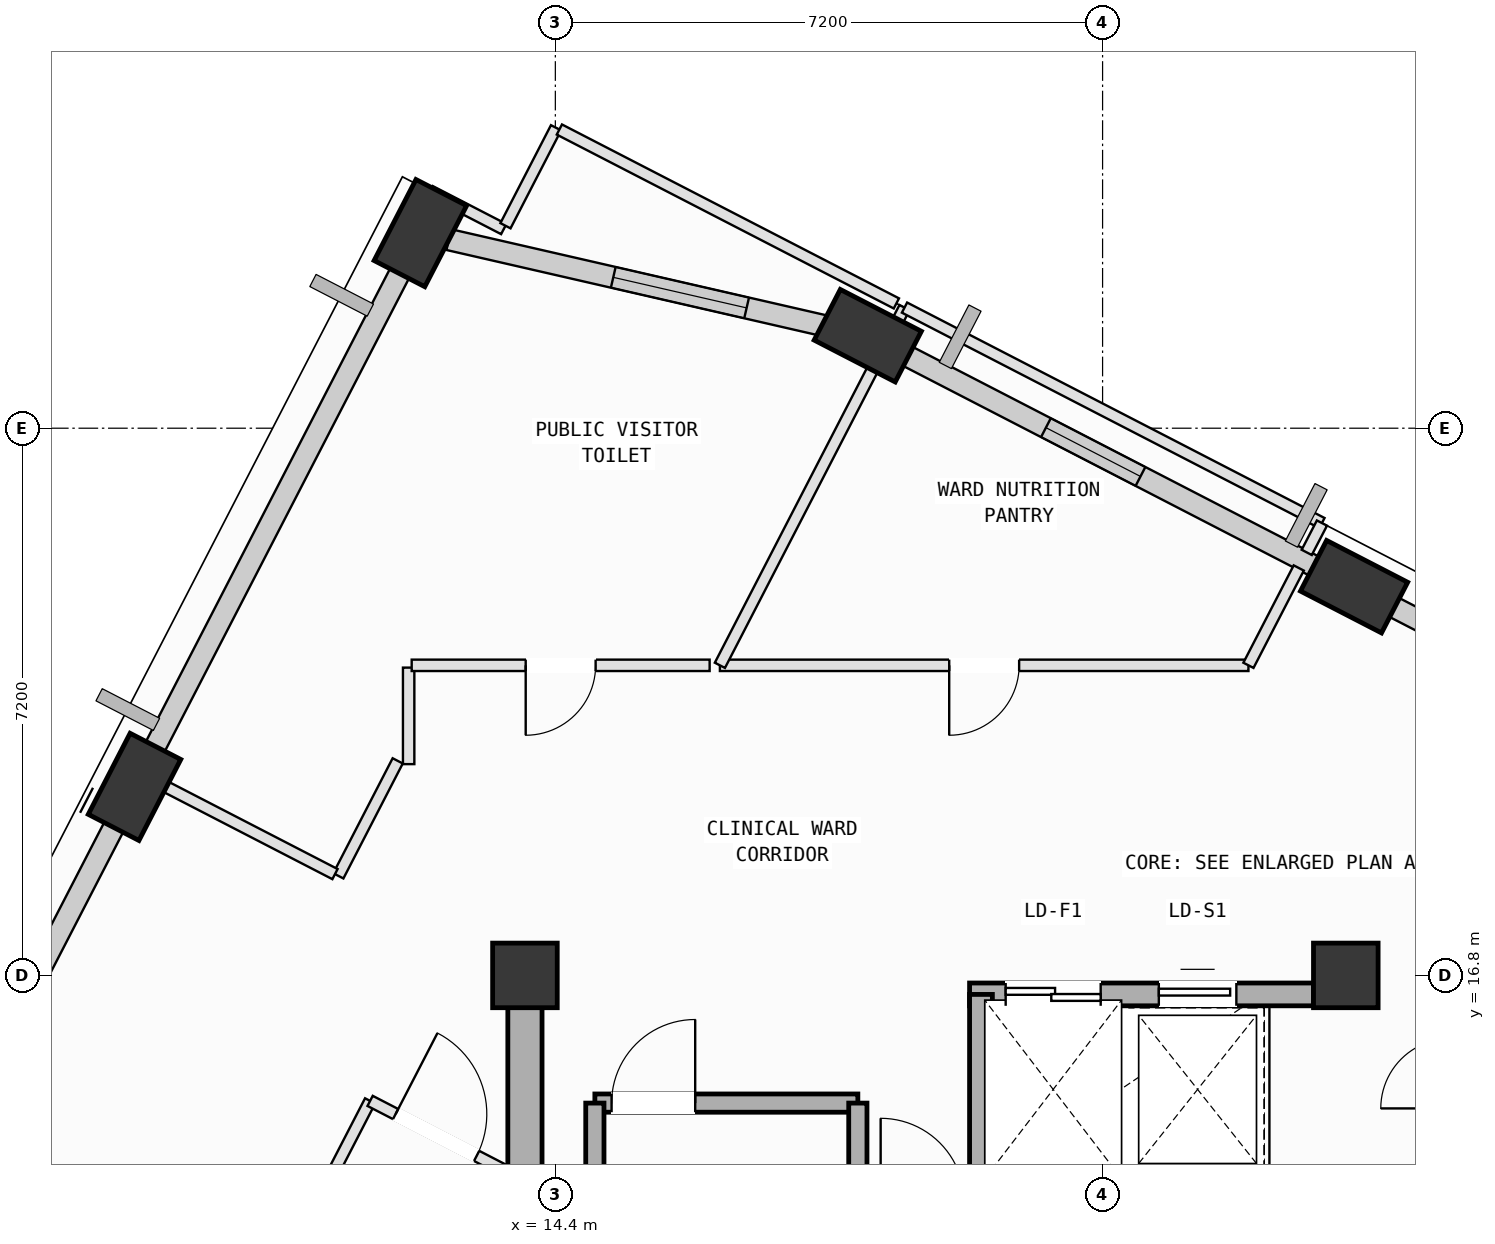
"""IFC4 building model, lengths in metres.
Left out: names, types, materials, properties, quantities, classifications, styles, units other than length and angle.
Written with IfcOpenShell. Run it as: python <this file> out.ifc"""

import sys

from ifc_helpers import new_model, si_unit, direction, frame, frame_2d, origin, origin_2d, place, context, subcontext, project, spatial, rectangle, extrude, element, fill, save


model = new_model("IFC4")
c1 = context("Model", 3, precision=1e-05, world=origin(), true_north=direction((0.0, 1.0)))
c2 = subcontext(c1, "Body", "Model", "MODEL_VIEW")
j1 = project(units=[si_unit("LENGTHUNIT", "METRE"), si_unit("PLANEANGLEUNIT", "RADIAN")], contexts=[c1])
p1 = place(None, origin())
s1 = spatial("IfcSite", under=j1, at=p1, CompositionType="ELEMENT")
p2 = place(p1, origin())
s2 = spatial("IfcBuilding", under=s1, at=p2, CompositionType="ELEMENT")
p3 = place(p2, frame((0.0, 0.0, 292.6)))
s3 = spatial("IfcBuildingStorey", under=s2, at=p3, CompositionType="ELEMENT", Elevation=292.6)
for number, where, z_axis, x_axis in (
    (1, (14.0, 16.8, 0.0), (0.0, 0.0, 1.0), (1.0, 0.0, 0.0)),
    (2, (24.8, 16.8, 0.0), (0.0, 0.0, 1.0), (1.0, 0.0, 0.0)),
):
    element("IfcColumn", number, at=place(p3, frame(where, z_axis=z_axis, x_axis=x_axis)), inside=s3, PredefinedType="COLUMN", context=c2, shape_type="SweptSolid", body=[
        extrude(rectangle(XDim=0.85, YDim=0.85, at=origin_2d()), origin(), (0.0, 0.0, 1.0), 4.0),
    ])
p4 = place(p3, frame((24.909, 21.915, 0.002), z_axis=(0.012270469901, -0.035895702993, 0.999280207987), x_axis=(-0.989094840415, 0.146248677258, 0.017398881126)))
e3 = element("IfcColumn", 3, at=p4, inside=s3, PredefinedType="COLUMN", context=c2, shape_type="SweptSolid", body=[
    extrude(rectangle(XDim=1.2, YDim=0.75, at=origin_2d()), origin(), (0.0, 0.0, 1.0), 3.999),
])
p5 = place(p3, frame((18.511, 25.217, 0.002), z_axis=(-0.001219437078, -0.062435178371, 0.998048276124), x_axis=(-0.879508980055, 0.475019608362, 0.028641328081)))
e4 = element("IfcColumn", 4, at=p5, inside=s3, PredefinedType="COLUMN", context=c2, shape_type="SweptSolid", body=[
    extrude(rectangle(XDim=1.2, YDim=0.75, at=origin_2d()), origin(), (0.0, 0.0, 1.0), 4.004),
])
p6 = place(p3, frame((12.624, 26.567, 0.002), z_axis=(-0.006572870301, -0.086664512123, 0.996215870037), x_axis=(0.524283941242, 0.848033873805, 0.077232751051)))
e5 = element("IfcColumn", 5, at=p6, inside=s3, PredefinedType="COLUMN", context=c2, shape_type="SweptSolid", body=[
    extrude(rectangle(XDim=1.2, YDim=0.75, at=origin_2d()), origin(), (0.0, 0.0, 1.0), 4.011),
])
p7 = place(p3, frame((8.863, 19.281, 0.002), z_axis=(0.023634379865, -0.101767573967, 0.994527413889), x_axis=(0.246838352146, 0.964599256067, 0.092839124866)))
e6 = element("IfcColumn", 6, at=p7, inside=s3, PredefinedType="COLUMN", context=c2, shape_type="SweptSolid", body=[
    extrude(rectangle(XDim=1.2, YDim=0.75, at=origin_2d()), origin(), (0.0, 0.0, 1.0), 4.018),
])
p8 = place(p3, frame((25.308, 21.709, 0.0), z_axis=(0.0, 0.0, 1.0), x_axis=(0.888620195741, -0.458643813565, 0.0)))
e7 = element("IfcWall", 7, at=p8, inside=s3, PredefinedType="SOLIDWALL", context=c2, shape_type="SweptSolid", body=[
    extrude(rectangle(XDim=6.958, YDim=0.28, at=frame_2d((3.479, 0.0))), origin(), (0.0, 0.0, 1.0), 3.165),
])
p9 = place(p3, frame((18.899, 25.017, 0.0), z_axis=(0.0, 0.0, 1.0), x_axis=(0.888622655643, -0.458639047485, 0.0)))
e8 = element("IfcWall", 8, at=p9, inside=s3, PredefinedType="SOLIDWALL", context=c2, shape_type="SweptSolid", body=[
    extrude(rectangle(XDim=6.424, YDim=0.28, at=frame_2d((3.212, 0.0))), origin(), (0.0, 0.0, 1.0), 3.265),
])
p10 = place(p9, frame((2.201, 0.0, 0.75)))
e9 = element("IfcOpeningElement", 9, at=p10, cuts=e8, PredefinedType="OPENING", context=c2, shape_type="SweptSolid", body=[
    extrude(rectangle(XDim=1.4, YDim=1.85, at=frame_2d((0.7, 0.925))), frame((0.0, 0.15, 0.0), z_axis=(0.0, -1.0, 0.0), x_axis=(1.0, 0.0, 0.0)), (0.0, 0.0, 1.0), 0.3),
])
p11 = place(p3, frame((12.999, 26.481, 0.0), z_axis=(0.0, 0.0, 1.0), x_axis=(0.974684468416, -0.223584854203, 0.0)))
e10 = element("IfcWall", 10, at=p11, inside=s3, PredefinedType="SOLIDWALL", context=c2, shape_type="SweptSolid", body=[
    extrude(rectangle(XDim=5.302, YDim=0.28, at=frame_2d((2.651, 0.0))), origin(), (0.0, 0.0, 1.0), 3.265),
])
p12 = place(p11, frame((2.22, 0.0, 0.75)))
e11 = element("IfcOpeningElement", 11, at=p12, cuts=e10, PredefinedType="OPENING", context=c2, shape_type="SweptSolid", body=[
    extrude(rectangle(XDim=1.8, YDim=2.05, at=frame_2d((0.9, 1.025))), frame((0.0, 0.15, 0.0), z_axis=(0.0, -1.0, 0.0), x_axis=(1.0, 0.0, 0.0)), (0.0, 0.0, 1.0), 0.3),
])
p13 = place(p3, frame((8.961, 19.47, 0.0), z_axis=(0.0, 0.0, 1.0), x_axis=(0.45865797747, 0.888612885177, 0.0)))
e12 = element("IfcWall", 12, at=p13, inside=s3, PredefinedType="SOLIDWALL", context=c2, shape_type="SweptSolid", body=[
    extrude(rectangle(XDim=7.434, YDim=0.28, at=frame_2d((3.717, 0.0))), origin(), (0.0, 0.0, 1.0), 3.265),
])
p14 = place(p3, frame((5.186, 12.156, 0.0), z_axis=(0.0, 0.0, 1.0), x_axis=(0.458658706645, 0.888612508813, 0.0)))
e13 = element("IfcWall", 13, at=p14, inside=s3, PredefinedType="SOLIDWALL", context=c2, shape_type="SweptSolid", body=[
    extrude(rectangle(XDim=7.485, YDim=0.28, at=frame_2d((3.742, 0.0))), origin(), (0.0, 0.0, 1.0), 3.265),
])
p15 = place(p3, frame((14.92, 15.12, 0.0), z_axis=(0.0, 0.0, 1.0), x_axis=(1.0, 0.0, 0.0)))
e14 = element("IfcWall", 14, at=p15, inside=s3, PredefinedType="SOLIDWALL", context=c2, shape_type="SweptSolid", body=[
    extrude(rectangle(XDim=3.46, YDim=0.24, at=frame_2d((1.73, 0.0))), origin(), (0.0, 0.0, 1.0), 3.78),
])
p16 = place(p15, frame((0.22, 0.0, 0.0)))
e15 = element("IfcOpeningElement", 15, at=p16, cuts=e14, PredefinedType="OPENING", context=c2, shape_type="SweptSolid", body=[
    extrude(rectangle(XDim=1.1, YDim=2.15, at=frame_2d((0.55, 1.075))), frame((0.0, 0.13, 0.0), z_axis=(0.0, -1.0, 0.0), x_axis=(1.0, 0.0, 0.0)), (0.0, 0.0, 1.0), 0.26),
])
for number, where, z_axis, x_axis in (
    (16, (18.38, 15.12, 0.0), (0.0, 0.0, 1.0), (0.0, -1.0, 0.0)),
    (17, (14.92, 8.025, 0.0), (0.0, 0.0, 1.0), (0.0, 1.0, 0.0)),
):
    element("IfcWall", number, at=place(p3, frame(where, z_axis=z_axis, x_axis=x_axis)), inside=s3, PredefinedType="SOLIDWALL", context=c2, shape_type="SweptSolid", body=[
        extrude(rectangle(XDim=7.095, YDim=0.24, at=frame_2d((3.548, 0.0))), origin(), (0.0, 0.0, 1.0), 3.78),
    ])
p17 = place(p3, frame((14.0, 16.8, 0.0), z_axis=(0.0, 0.0, 1.0), x_axis=(0.0, -1.0, 0.0)))
e18 = element("IfcWall", 18, at=p17, inside=s3, PredefinedType="SHEAR", context=c2, shape_type="SweptSolid", body=[
    extrude(rectangle(XDim=9.0, YDim=0.45, at=frame_2d((4.5, 0.0))), origin(), (0.0, 0.0, 1.0), 3.78),
])
p18 = place(p3, frame((19.85, 16.55, 0.0), z_axis=(0.0, 0.0, 1.0), x_axis=(1.0, 0.0, 0.0)))
e19 = element("IfcWall", 19, at=p18, inside=s3, PredefinedType="SOLIDWALL", context=c2, shape_type="SweptSolid", body=[
    extrude(rectangle(XDim=4.525, YDim=0.3, at=frame_2d((2.262, 0.0))), origin(), (0.0, 0.0, 1.0), 3.78),
])
p19 = place(p18, frame((0.475, 0.0, 0.0)))
e20 = element("IfcOpeningElement", 20, at=p19, cuts=e19, PredefinedType="OPENING", context=c2, shape_type="SweptSolid", body=[
    extrude(rectangle(XDim=1.25, YDim=2.18, at=frame_2d((0.625, 1.09))), frame((0.0, 0.16, 0.0), z_axis=(0.0, -1.0, 0.0), x_axis=(1.0, 0.0, 0.0)), (0.0, 0.0, 1.0), 0.32),
])
p20 = place(p18, frame((2.49, 0.0, 0.0)))
e21 = element("IfcOpeningElement", 21, at=p20, cuts=e19, PredefinedType="OPENING", context=c2, shape_type="SweptSolid", body=[
    extrude(rectangle(XDim=1.02, YDim=2.12, at=frame_2d((0.51, 1.06))), frame((0.0, 0.16, 0.0), z_axis=(0.0, -1.0, 0.0), x_axis=(1.0, 0.0, 0.0)), (0.0, 0.0, 1.0), 0.32),
])
p21 = place(p3, frame((20.0, 13.82, 0.0), z_axis=(0.0, 0.0, 1.0), x_axis=(0.0, 1.0, 0.0)))
e22 = element("IfcWall", 22, at=p21, inside=s3, PredefinedType="SOLIDWALL", context=c2, shape_type="SweptSolid", body=[
    extrude(rectangle(XDim=2.73, YDim=0.3, at=frame_2d((1.365, 0.0))), origin(), (0.0, 0.0, 1.0), 3.78),
])
p22 = place(p3, frame((8.815, 9.048, 0.0), z_axis=(0.0, 0.0, 1.0), x_axis=(0.458543271669, 0.888672081258, 0.0)))
e23 = element("IfcWall", 23, at=p22, inside=s3, PredefinedType="PARTITIONING", context=c2, shape_type="SweptSolid", body=[
    extrude(rectangle(XDim=6.865, YDim=0.15, at=frame_2d((3.433, 0.0))), origin(), (0.0, 0.0, 1.0), 3.78),
])
p23 = place(p3, frame((11.963, 15.149, 0.0), z_axis=(0.0, 0.0, 1.0), x_axis=(0.888443021372, -0.458986925496, 0.0)))
e24 = element("IfcWall", 24, at=p23, inside=s3, PredefinedType="PARTITIONING", context=c2, shape_type="SweptSolid", body=[
    extrude(rectangle(XDim=2.133, YDim=0.15, at=frame_2d((1.066, 0.0))), origin(), (0.0, 0.0, 1.0), 3.78),
])
p24 = place(p23, frame((0.377, 0.0, 0.0)))
e25 = element("IfcOpeningElement", 25, at=p24, cuts=e24, PredefinedType="OPENING", context=c2, shape_type="SweptSolid", body=[
    extrude(rectangle(XDim=1.2, YDim=2.15, at=frame_2d((0.6, 1.075))), frame((0.0, 0.085, 0.0), z_axis=(0.0, -1.0, 0.0), x_axis=(1.0, 0.0, 0.0)), (0.0, 0.0, 1.0), 0.17),
])
p25 = place(p3, frame((23.519, 20.88, 0.0), z_axis=(0.0, 0.0, 1.0), x_axis=(-1.0, 0.0, 0.0)))
e26 = element("IfcWall", 26, at=p25, inside=s3, PredefinedType="PARTITIONING", context=c2, shape_type="SweptSolid", body=[
    extrude(rectangle(XDim=6.954, YDim=0.15, at=frame_2d((3.477, 0.0))), origin(), (0.0, 0.0, 1.0), 3.415),
])
p26 = place(p25, frame((3.017, 0.0, 0.0)))
e27 = element("IfcOpeningElement", 27, at=p26, cuts=e26, PredefinedType="OPENING", context=c2, shape_type="SweptSolid", body=[
    extrude(rectangle(XDim=0.92, YDim=2.1, at=frame_2d((0.46, 1.05))), frame((0.0, 0.085, 0.0), z_axis=(0.0, -1.0, 0.0), x_axis=(1.0, 0.0, 0.0)), (0.0, 0.0, 1.0), 0.17),
])
p27 = place(p3, frame((16.565, 20.88, 0.0), z_axis=(0.0, 0.0, 1.0), x_axis=(0.458571299258, 0.888657618826, 0.0)))
e28 = element("IfcWall", 28, at=p27, inside=s3, PredefinedType="PARTITIONING", context=c2, shape_type="SweptSolid", body=[
    extrude(rectangle(XDim=5.297, YDim=0.15, at=frame_2d((2.648, 0.0))), origin(), (0.0, 0.0, 1.0), 3.78),
])
p28 = place(p3, frame((18.994, 25.587, 0.0), z_axis=(0.0, 0.0, 1.0), x_axis=(0.888601960955, -0.458679141652, 0.0)))
e29 = element("IfcWall", 29, at=p28, inside=s3, PredefinedType="PARTITIONING", context=c2, shape_type="SweptSolid", body=[
    extrude(rectangle(XDim=6.181, YDim=0.15, at=frame_2d((3.09, 0.0))), origin(), (0.0, 0.0, 1.0), 3.78),
])
p29 = place(p3, frame((24.486, 22.752, 0.0), z_axis=(0.0, 0.0, 1.0), x_axis=(-0.460415496912, -0.887703537339, 0.0)))
e30 = element("IfcWall", 30, at=p29, inside=s3, PredefinedType="PARTITIONING", context=c2, shape_type="SweptSolid", body=[
    extrude(rectangle(XDim=0.435, YDim=0.15, at=frame_2d((0.217, 0.0))), origin(), (0.0, 0.0, 1.0), 3.78),
])
p30 = place(p3, frame((24.181, 22.161, 0.0), z_axis=(0.0, 0.0, 1.0), x_axis=(-0.459026734085, -0.888422454351, 0.0)))
e31 = element("IfcWall", 31, at=p30, inside=s3, PredefinedType="PARTITIONING", context=c2, shape_type="SweptSolid", body=[
    extrude(rectangle(XDim=1.442, YDim=0.15, at=frame_2d((0.721, 0.0))), origin(), (0.0, 0.0, 1.0), 3.78),
])
p31 = place(p3, frame((12.47, 20.85, 0.0), z_axis=(0.0, 0.0, 1.0), x_axis=(0.0, -1.0, 0.0)))
e32 = element("IfcWall", 32, at=p31, inside=s3, PredefinedType="PARTITIONING", context=c2, shape_type="SweptSolid", body=[
    extrude(rectangle(XDim=1.27, YDim=0.15, at=frame_2d((0.635, 0.0))), origin(), (0.0, 0.0, 1.0), 3.415),
])
p32 = place(p3, frame((12.326, 19.623, 0.0), z_axis=(0.0, 0.0, 1.0), x_axis=(-0.45870501117, -0.888588607134, 0.0)))
e33 = element("IfcWall", 33, at=p32, inside=s3, PredefinedType="PARTITIONING", context=c2, shape_type="SweptSolid", body=[
    extrude(rectangle(XDim=1.703, YDim=0.15, at=frame_2d((0.851, 0.0))), origin(), (0.0, 0.0, 1.0), 3.415),
])
p33 = place(p3, frame((11.501, 18.133, 0.0), z_axis=(0.0, 0.0, 1.0), x_axis=(-0.888561279263, 0.458757945975, 0.0)))
e34 = element("IfcWall", 34, at=p33, inside=s3, PredefinedType="PARTITIONING", context=c2, shape_type="SweptSolid", body=[
    extrude(rectangle(XDim=2.757, YDim=0.15, at=frame_2d((1.379, 0.0))), origin(), (0.0, 0.0, 1.0), 3.78),
])
p34 = place(p3, frame((12.202, 26.163, 0.0), z_axis=(0.0, 0.0, 1.0), x_axis=(0.458862802712, 0.888507134629, 0.0)))
e35 = element("IfcWall", 35, at=p34, inside=s3, PredefinedType="PARTITIONING", context=c2, shape_type="SweptSolid", body=[
    extrude(rectangle(XDim=1.103, YDim=0.15, at=frame_2d((0.552, 0.0))), origin(), (0.0, 0.0, 1.0), 3.265),
])
p35 = place(p3, frame((12.752, 27.12, 0.0), z_axis=(0.0, 0.0, 1.0), x_axis=(0.888667750938, -0.458551663875, 0.0)))
e36 = element("IfcWall", 36, at=p35, inside=s3, PredefinedType="PARTITIONING", context=c2, shape_type="SweptSolid", body=[
    extrude(rectangle(XDim=1.09, YDim=0.15, at=frame_2d((0.545, 0.0))), origin(), (0.0, 0.0, 1.0), 3.78),
])
p36 = place(p3, frame((13.744, 26.664, 0.0), z_axis=(0.0, 0.0, 1.0), x_axis=(0.458557157099, 0.888664916419, 0.0)))
e37 = element("IfcWall", 37, at=p36, inside=s3, PredefinedType="PARTITIONING", context=c2, shape_type="SweptSolid", body=[
    extrude(rectangle(XDim=1.45, YDim=0.15, at=frame_2d((0.725, 0.0))), origin(), (0.0, 0.0, 1.0), 3.78),
])
p37 = place(p3, frame((14.453, 27.93, 0.0), z_axis=(0.0, 0.0, 1.0), x_axis=(0.888679189738, -0.458529494936, 0.0)))
e38 = element("IfcWall", 38, at=p37, inside=s3, PredefinedType="PARTITIONING", context=c2, shape_type="SweptSolid", body=[
    extrude(rectangle(XDim=4.99, YDim=0.15, at=frame_2d((2.495, 0.0))), origin(), (0.0, 0.0, 1.0), 3.78),
])
p38 = place(p3, frame((16.43, 20.88, 0.0), z_axis=(0.0, 0.0, 1.0), x_axis=(-1.0, 0.0, 0.0)))
e39 = element("IfcWall", 39, at=p38, inside=s3, PredefinedType="PARTITIONING", context=c2, shape_type="SweptSolid", body=[
    extrude(rectangle(XDim=3.92, YDim=0.15, at=frame_2d((1.96, 0.0))), origin(), (0.0, 0.0, 1.0), 3.415),
])
p39 = place(p38, frame((1.5, 0.0, 0.0)))
e40 = element("IfcOpeningElement", 40, at=p39, cuts=e39, PredefinedType="OPENING", context=c2, shape_type="SweptSolid", body=[
    extrude(rectangle(XDim=0.92, YDim=2.1, at=frame_2d((0.46, 1.05))), frame((0.0, 0.085, 0.0), z_axis=(0.0, -1.0, 0.0), x_axis=(1.0, 0.0, 0.0)), (0.0, 0.0, 1.0), 0.17),
])
p40 = place(p10, origin())
e41 = element("IfcWindow", 41, at=p40, inside=s3, PartitioningType="SINGLE_PANEL", PredefinedType="WINDOW", context=c2, shape_type="SweptSolid", body=[
    extrude(rectangle(XDim=1.4, YDim=1.85, at=frame_2d((0.7, 0.925))), frame((0.0, 0.03, 0.0), z_axis=(0.0, -1.0, 0.0), x_axis=(1.0, 0.0, 0.0)), (0.0, 0.0, 1.0), 0.06),
])
fill(e9, e41)
p41 = place(p12, origin())
e42 = element("IfcWindow", 42, at=p41, inside=s3, PartitioningType="SINGLE_PANEL", PredefinedType="WINDOW", context=c2, shape_type="SweptSolid", body=[
    extrude(rectangle(XDim=1.8, YDim=2.05, at=frame_2d((0.9, 1.025))), frame((0.0, 0.03, 0.0), z_axis=(0.0, -1.0, 0.0), x_axis=(1.0, 0.0, 0.0)), (0.0, 0.0, 1.0), 0.06),
])
fill(e11, e42)
p42 = place(p16, origin())
e43 = element("IfcDoor", 43, at=p42, inside=s3, OperationType="SINGLE_SWING_RIGHT", PredefinedType="DOOR", context=c2, shape_type="SweptSolid", body=[
    extrude(rectangle(XDim=1.1, YDim=2.15, at=frame_2d((0.55, 1.075))), frame((0.0, 0.025, 0.0), z_axis=(0.0, -1.0, 0.0), x_axis=(1.0, 0.0, 0.0)), (0.0, 0.0, 1.0), 0.05),
])
fill(e15, e43)
p43 = place(p19, origin())
e44 = element("IfcDoor", 44, at=p43, inside=s3, OperationType="DOUBLE_DOOR_SLIDING", PredefinedType="DOOR", context=c2, shape_type="SweptSolid", body=[
    extrude(rectangle(XDim=1.25, YDim=2.18, at=frame_2d((0.625, 1.09))), frame((0.0, 0.025, 0.0), z_axis=(0.0, -1.0, 0.0), x_axis=(1.0, 0.0, 0.0)), (0.0, 0.0, 1.0), 0.05),
])
fill(e20, e44)
p44 = place(p20, origin())
e45 = element("IfcDoor", 45, at=p44, inside=s3, OperationType="SLIDING_TO_LEFT", PredefinedType="DOOR", context=c2, shape_type="SweptSolid", body=[
    extrude(rectangle(XDim=1.02, YDim=2.12, at=frame_2d((0.51, 1.06))), frame((0.0, 0.025, 0.0), z_axis=(0.0, -1.0, 0.0), x_axis=(1.0, 0.0, 0.0)), (0.0, 0.0, 1.0), 0.05),
])
fill(e21, e45)
p45 = place(p24, origin())
e46 = element("IfcDoor", 46, at=p45, inside=s3, OperationType="SINGLE_SWING_LEFT", PredefinedType="DOOR", context=c2, shape_type="SweptSolid", body=[
    extrude(rectangle(XDim=1.2, YDim=2.15, at=frame_2d((0.6, 1.075))), frame((0.0, 0.025, 0.0), z_axis=(0.0, -1.0, 0.0), x_axis=(1.0, 0.0, 0.0)), (0.0, 0.0, 1.0), 0.05),
])
fill(e25, e46)
p46 = place(p26, origin())
e47 = element("IfcDoor", 47, at=p46, inside=s3, OperationType="SINGLE_SWING_RIGHT", PredefinedType="DOOR", context=c2, shape_type="SweptSolid", body=[
    extrude(rectangle(XDim=0.92, YDim=2.1, at=frame_2d((0.46, 1.05))), frame((0.0, 0.025, 0.0), z_axis=(0.0, -1.0, 0.0), x_axis=(1.0, 0.0, 0.0)), (0.0, 0.0, 1.0), 0.05),
])
fill(e27, e47)
p47 = place(p39, origin())
e48 = element("IfcDoor", 48, at=p47, inside=s3, OperationType="SINGLE_SWING_RIGHT", PredefinedType="DOOR", context=c2, shape_type="SweptSolid", body=[
    extrude(rectangle(XDim=0.92, YDim=2.1, at=frame_2d((0.46, 1.05))), frame((0.0, 0.025, 0.0), z_axis=(0.0, -1.0, 0.0), x_axis=(1.0, 0.0, 0.0)), (0.0, 0.0, 1.0), 0.05),
])
fill(e40, e48)
save(model, sys.argv[1])
